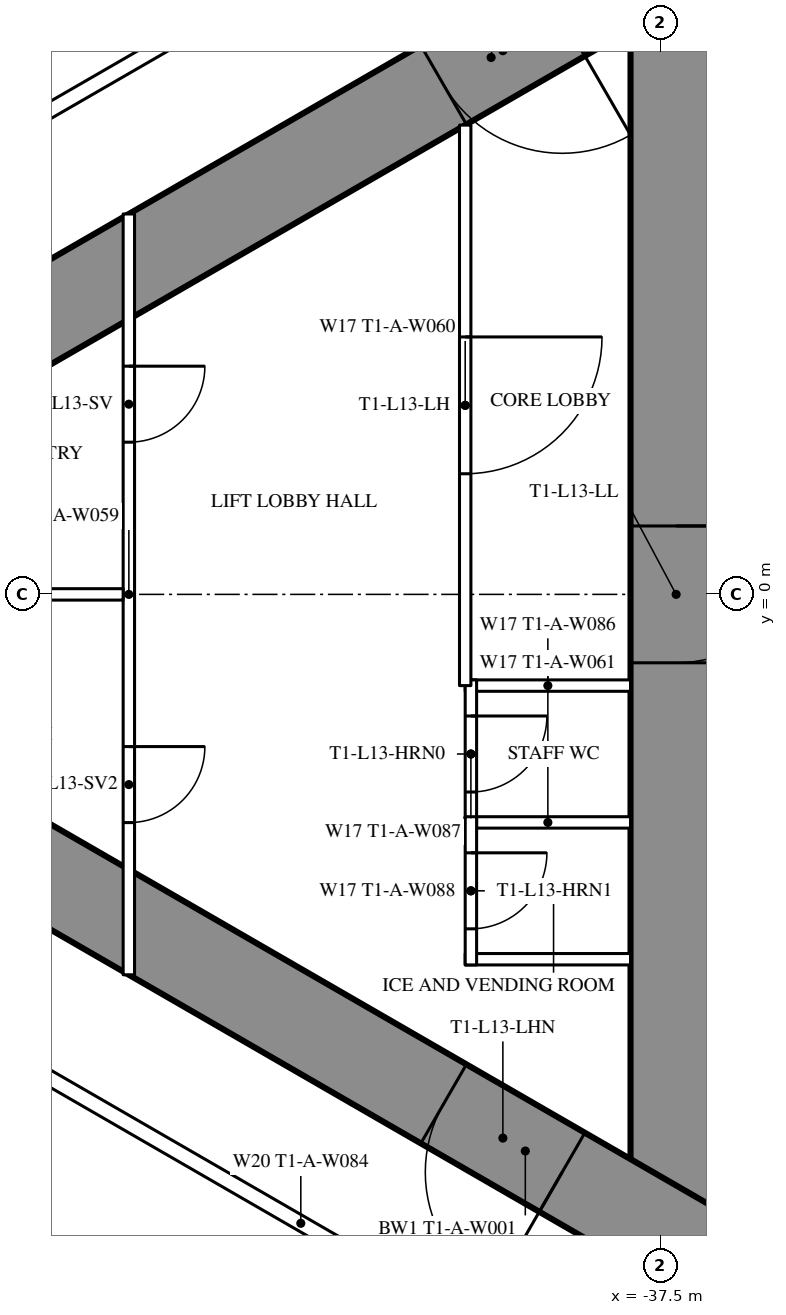
"""IFC4 building model, lengths in metres.
Left out: names, types, materials, properties, quantities, classifications, styles, units other than length and angle.
Written with IfcOpenShell. Run it as: python <this file> out.ifc"""

import sys

from ifc_helpers import new_model, si_unit, direction, frame, frame_2d, origin, place, context, subcontext, project, spatial, rectangle, extrude, element, fill, save


model = new_model("IFC4")
c1 = context("Model", 3, precision=1e-05, world=origin(), true_north=direction((0.0, 1.0)))
c2 = subcontext(c1, "Body", "Model", "MODEL_VIEW")
j1 = project(units=[si_unit("LENGTHUNIT", "METRE"), si_unit("PLANEANGLEUNIT", "RADIAN")], contexts=[c1])
p1 = place(None, origin())
s1 = spatial("IfcSite", under=j1, at=p1, CompositionType="ELEMENT")
p2 = place(p1, origin())
s2 = spatial("IfcBuilding", under=s1, at=p2, CompositionType="ELEMENT")
p3 = place(p2, frame((0.0, 0.0, 53.0)))
s3 = spatial("IfcBuildingStorey", under=s2, at=p3, CompositionType="ELEMENT", Elevation=53.0)
p4 = place(p3, frame((-37.3, 8.6, 0.0), z_axis=(0.0, 0.0, 1.0), x_axis=(0.0, -1.0, 0.0)))
e1 = element("IfcWall", 1, at=p4, inside=s3, PredefinedType="SHEAR", context=c2, shape_type="SweptSolid", body=[
    extrude(rectangle(XDim=17.2, YDim=1.2, at=frame_2d((8.6, 0.0))), origin(), (0.0, 0.0, 1.0), 3.5),
])
p5 = place(p4, frame((7.7, 0.0, 0.0)))
e2 = element("IfcOpeningElement", 2, at=p5, cuts=e1, PredefinedType="OPENING", context=c2, shape_type="SweptSolid", body=[
    extrude(rectangle(XDim=1.8, YDim=2.2, at=frame_2d((0.9, 1.1))), frame((0.0, 0.61, 0.0), z_axis=(0.0, -1.0, 0.0), x_axis=(1.0, 0.0, 0.0)), (0.0, 0.0, 1.0), 1.22),
])
p6 = place(p3, frame((-27.2, 14.3, 0.0), z_axis=(0.0, 0.0, 1.0), x_axis=(-0.866026593062, -0.499997940104, 0.0)))
e3 = element("IfcWall", 3, at=p6, inside=s3, PredefinedType="SHEAR", context=c2, shape_type="SweptSolid", body=[
    extrude(rectangle(XDim=28.946, YDim=1.2, at=frame_2d((14.473, 0.0))), origin(), (0.0, 0.0, 1.0), 3.5),
])
p7 = place(p6, frame((4.6, 0.0, 0.0)))
e4 = element("IfcOpeningElement", 4, at=p7, cuts=e3, PredefinedType="OPENING", context=c2, shape_type="SweptSolid", body=[
    extrude(rectangle(XDim=1.0, YDim=2.2, at=frame_2d((0.5, 1.1))), frame((0.0, 0.61, 0.0), z_axis=(0.0, -1.0, 0.0), x_axis=(1.0, 0.0, 0.0)), (0.0, 0.0, 1.0), 1.22),
])
p8 = place(p6, frame((13.395, 0.0, 0.0)))
e5 = element("IfcOpeningElement", 5, at=p8, cuts=e3, PredefinedType="OPENING", context=c2, shape_type="SweptSolid", body=[
    extrude(rectangle(XDim=1.8, YDim=2.2, at=frame_2d((0.9, 1.1))), frame((0.0, 0.61, 0.0), z_axis=(0.0, -1.0, 0.0), x_axis=(1.0, 0.0, 0.0)), (0.0, 0.0, 1.0), 1.22),
])
p9 = place(p3, frame((-27.2, -14.3, 0.0), z_axis=(0.0, 0.0, 1.0), x_axis=(-0.866024021859, 0.500002393557, 0.0)))
e6 = element("IfcWall", 6, at=p9, inside=s3, PredefinedType="SHEAR", context=c2, shape_type="SweptSolid", body=[
    extrude(rectangle(XDim=27.907, YDim=1.2, at=frame_2d((13.954, 0.0))), origin(), (0.0, 0.0, 1.0), 3.5),
])
p10 = place(p9, frame((4.6, 0.0, 0.0)))
e7 = element("IfcOpeningElement", 7, at=p10, cuts=e6, PredefinedType="OPENING", context=c2, shape_type="SweptSolid", body=[
    extrude(rectangle(XDim=1.0, YDim=2.2, at=frame_2d((0.5, 1.1))), frame((0.0, 0.61, 0.0), z_axis=(0.0, -1.0, 0.0), x_axis=(1.0, 0.0, 0.0)), (0.0, 0.0, 1.0), 1.22),
])
p11 = place(p9, frame((13.395, 0.0, 0.0)))
e8 = element("IfcOpeningElement", 8, at=p11, cuts=e6, PredefinedType="OPENING", context=c2, shape_type="SweptSolid", body=[
    extrude(rectangle(XDim=1.8, YDim=2.2, at=frame_2d((0.9, 1.1))), frame((0.0, 0.61, 0.0), z_axis=(0.0, -1.0, 0.0), x_axis=(1.0, 0.0, 0.0)), (0.0, 0.0, 1.0), 1.22),
])
p12 = place(p3, frame((-37.7, 10.894, 0.0), z_axis=(0.0, 0.0, 1.0), x_axis=(-0.866027905338, -0.499995667157, 0.0)))
e9 = element("IfcWall", 9, at=p12, inside=s3, PredefinedType="PARTITIONING", context=c2, shape_type="SweptSolid", body=[
    extrude(rectangle(XDim=21.787, YDim=0.2, at=frame_2d((10.894, 0.0))), origin(), (0.0, 0.0, 1.0), 3.25),
])
p13 = place(p12, frame((20.237, 0.0, 0.0)))
e10 = element("IfcOpeningElement", 10, at=p13, cuts=e9, PredefinedType="OPENING", context=c2, shape_type="SweptSolid", body=[
    extrude(rectangle(XDim=0.95, YDim=2.2, at=frame_2d((0.475, 1.1))), frame((0.0, 0.11, 0.0), z_axis=(0.0, -1.0, 0.0), x_axis=(1.0, 0.0, 0.0)), (0.0, 0.0, 1.0), 0.22),
])
p14 = place(p12, frame((2.95, 0.0, 0.0)))
e11 = element("IfcOpeningElement", 11, at=p14, cuts=e9, PredefinedType="OPENING", context=c2, shape_type="SweptSolid", body=[
    extrude(rectangle(XDim=0.95, YDim=2.2, at=frame_2d((0.475, 1.1))), frame((0.0, 0.11, 0.0), z_axis=(0.0, -1.0, 0.0), x_axis=(1.0, 0.0, 0.0)), (0.0, 0.0, 1.0), 0.22),
])
p15 = place(p3, frame((-36.92, -11.344, 0.0), z_axis=(0.0, 0.0, 1.0), x_axis=(-0.866025017052, 0.500000669839, 0.0)))
e12 = element("IfcWall", 12, at=p15, inside=s3, PredefinedType="PARTITIONING", context=c2, shape_type="SweptSolid", body=[
    extrude(rectangle(XDim=12.28, YDim=0.2, at=frame_2d((6.14, 0.0))), origin(), (0.0, 0.0, 1.0), 3.25),
])
p16 = place(p15, frame((3.35, 0.0, 0.0)))
e13 = element("IfcOpeningElement", 13, at=p16, cuts=e12, PredefinedType="OPENING", context=c2, shape_type="SweptSolid", body=[
    extrude(rectangle(XDim=1.0, YDim=2.2, at=frame_2d((0.5, 1.1))), frame((0.0, 0.11, 0.0), z_axis=(0.0, -1.0, 0.0), x_axis=(1.0, 0.0, 0.0)), (0.0, 0.0, 1.0), 0.22),
])
for number, where, z_axis, x_axis in (
    (14, (-37.9, -1.2, 0.0), (0.0, 0.0, 1.0), (-1.0, 0.0, 0.0)),
    (15, (-37.9, -3.0, 0.0), (0.0, 0.0, 1.0), (-1.0, 0.0, 0.0)),
    (16, (-37.9, -4.8, 0.0), (0.0, 0.0, 1.0), (-1.0, 0.0, 0.0)),
):
    element("IfcWall", number, at=place(p3, frame(where, z_axis=z_axis, x_axis=x_axis)), inside=s3, PredefinedType="PARTITIONING", context=c2, shape_type="SweptSolid", body=[
        extrude(rectangle(XDim=2.175, YDim=0.15, at=frame_2d((1.087, 0.0))), origin(), (0.0, 0.0, 1.0), 3.25),
    ])
p17 = place(p3, frame((-40.0, -1.125, 0.0), z_axis=(0.0, 0.0, 1.0), x_axis=(0.0, -1.0, 0.0)))
e17 = element("IfcWall", 17, at=p17, inside=s3, PredefinedType="PARTITIONING", context=c2, shape_type="SweptSolid", body=[
    extrude(rectangle(XDim=1.95, YDim=0.15, at=frame_2d((0.975, 0.0))), origin(), (0.0, 0.0, 1.0), 3.25),
])
p18 = place(p17, frame((0.475, 0.0, 0.0)))
e18 = element("IfcOpeningElement", 18, at=p18, cuts=e17, PredefinedType="OPENING", context=c2, shape_type="SweptSolid", body=[
    extrude(rectangle(XDim=1.0, YDim=2.2, at=frame_2d((0.5, 1.1))), frame((0.0, 0.085, 0.0), z_axis=(0.0, -1.0, 0.0), x_axis=(1.0, 0.0, 0.0)), (0.0, 0.0, 1.0), 0.17),
])
p19 = place(p3, frame((-40.0, -2.925, 0.0), z_axis=(0.0, 0.0, 1.0), x_axis=(0.0, -1.0, 0.0)))
e19 = element("IfcWall", 19, at=p19, inside=s3, PredefinedType="PARTITIONING", context=c2, shape_type="SweptSolid", body=[
    extrude(rectangle(XDim=1.95, YDim=0.15, at=frame_2d((0.975, 0.0))), origin(), (0.0, 0.0, 1.0), 3.25),
])
p20 = place(p19, frame((0.475, 0.0, 0.0)))
e20 = element("IfcOpeningElement", 20, at=p20, cuts=e19, PredefinedType="OPENING", context=c2, shape_type="SweptSolid", body=[
    extrude(rectangle(XDim=1.0, YDim=2.2, at=frame_2d((0.5, 1.1))), frame((0.0, 0.085, 0.0), z_axis=(0.0, -1.0, 0.0), x_axis=(1.0, 0.0, 0.0)), (0.0, 0.0, 1.0), 0.17),
])
p21 = place(p3, frame((-40.075, 6.174, 0.0), z_axis=(0.0, 0.0, 1.0), x_axis=(0.0, -1.0, 0.0)))
e21 = element("IfcWall", 21, at=p21, inside=s3, PredefinedType="PARTITIONING", context=c2, shape_type="SweptSolid", body=[
    extrude(rectangle(XDim=7.374, YDim=0.15, at=frame_2d((3.687, 0.0))), origin(), (0.0, 0.0, 1.0), 3.25),
])
p22 = place(p21, frame((2.787, 0.0, 0.0)))
e22 = element("IfcOpeningElement", 22, at=p22, cuts=e21, PredefinedType="OPENING", context=c2, shape_type="SweptSolid", body=[
    extrude(rectangle(XDim=1.8, YDim=2.2, at=frame_2d((0.9, 1.1))), frame((0.0, 0.085, 0.0), z_axis=(0.0, -1.0, 0.0), x_axis=(1.0, 0.0, 0.0)), (0.0, 0.0, 1.0), 0.17),
])
p23 = place(p3, frame((-44.5, 5.005, 0.0), z_axis=(0.0, 0.0, 1.0), x_axis=(0.0, -1.0, 0.0)))
e23 = element("IfcWall", 23, at=p23, inside=s3, PredefinedType="PARTITIONING", context=c2, shape_type="SweptSolid", body=[
    extrude(rectangle(XDim=10.009, YDim=0.15, at=frame_2d((5.005, 0.0))), origin(), (0.0, 0.0, 1.0), 2.45),
])
p24 = place(p23, frame((2.002, 0.0, 0.0)))
e24 = element("IfcOpeningElement", 24, at=p24, cuts=e23, PredefinedType="OPENING", context=c2, shape_type="SweptSolid", body=[
    extrude(rectangle(XDim=1.0, YDim=2.2, at=frame_2d((0.5, 1.1))), frame((0.0, 0.085, 0.0), z_axis=(0.0, -1.0, 0.0), x_axis=(1.0, 0.0, 0.0)), (0.0, 0.0, 1.0), 0.17),
])
p25 = place(p23, frame((7.007, 0.0, 0.0)))
e25 = element("IfcOpeningElement", 25, at=p25, cuts=e23, PredefinedType="OPENING", context=c2, shape_type="SweptSolid", body=[
    extrude(rectangle(XDim=1.0, YDim=2.2, at=frame_2d((0.5, 1.1))), frame((0.0, 0.085, 0.0), z_axis=(0.0, -1.0, 0.0), x_axis=(1.0, 0.0, 0.0)), (0.0, 0.0, 1.0), 0.17),
])
p26 = place(p3, frame((-44.575, 0.0, 0.0), z_axis=(0.0, 0.0, 1.0), x_axis=(-1.0, 0.0, 0.0)))
e26 = element("IfcWall", 26, at=p26, inside=s3, PredefinedType="PARTITIONING", context=c2, shape_type="SweptSolid", body=[
    extrude(rectangle(XDim=8.593, YDim=0.15, at=frame_2d((4.297, 0.0))), origin(), (0.0, 0.0, 1.0), 2.25),
])
p27 = place(p18, origin())
e27 = element("IfcDoor", 27, at=p27, inside=s3, OperationType="SINGLE_SWING_LEFT", PredefinedType="DOOR", context=c2, shape_type="SweptSolid", body=[
    extrude(rectangle(XDim=1.0, YDim=2.2, at=frame_2d((0.5, 1.1))), frame((0.0, 0.025, 0.0), z_axis=(0.0, -1.0, 0.0), x_axis=(1.0, 0.0, 0.0)), (0.0, 0.0, 1.0), 0.05),
])
fill(e18, e27)
p28 = place(p20, origin())
e28 = element("IfcDoor", 28, at=p28, inside=s3, OperationType="SINGLE_SWING_LEFT", PredefinedType="DOOR", context=c2, shape_type="SweptSolid", body=[
    extrude(rectangle(XDim=1.0, YDim=2.2, at=frame_2d((0.5, 1.1))), frame((0.0, 0.025, 0.0), z_axis=(0.0, -1.0, 0.0), x_axis=(1.0, 0.0, 0.0)), (0.0, 0.0, 1.0), 0.05),
])
fill(e20, e28)
p29 = place(p22, origin())
e29 = element("IfcDoor", 29, at=p29, inside=s3, OperationType="DOUBLE_DOOR_SINGLE_SWING", PredefinedType="DOOR", context=c2, shape_type="SweptSolid", body=[
    extrude(rectangle(XDim=1.8, YDim=2.2, at=frame_2d((0.9, 1.1))), frame((0.0, 0.025, 0.0), z_axis=(0.0, -1.0, 0.0), x_axis=(1.0, 0.0, 0.0)), (0.0, 0.0, 1.0), 0.05),
])
fill(e22, e29)
p30 = place(p24, origin())
e30 = element("IfcDoor", 30, at=p30, inside=s3, OperationType="SINGLE_SWING_LEFT", PredefinedType="DOOR", context=c2, shape_type="SweptSolid", body=[
    extrude(rectangle(XDim=1.0, YDim=2.2, at=frame_2d((0.5, 1.1))), frame((0.0, 0.025, 0.0), z_axis=(0.0, -1.0, 0.0), x_axis=(1.0, 0.0, 0.0)), (0.0, 0.0, 1.0), 0.05),
])
fill(e24, e30)
p31 = place(p25, origin())
e31 = element("IfcDoor", 31, at=p31, inside=s3, OperationType="SINGLE_SWING_LEFT", PredefinedType="DOOR", context=c2, shape_type="SweptSolid", body=[
    extrude(rectangle(XDim=1.0, YDim=2.2, at=frame_2d((0.5, 1.1))), frame((0.0, 0.025, 0.0), z_axis=(0.0, -1.0, 0.0), x_axis=(1.0, 0.0, 0.0)), (0.0, 0.0, 1.0), 0.05),
])
fill(e25, e31)
p32 = place(p8, origin())
e32 = element("IfcDoor", 32, at=p32, inside=s3, OperationType="DOUBLE_DOOR_SINGLE_SWING", PredefinedType="DOOR", context=c2, shape_type="SweptSolid", body=[
    extrude(rectangle(XDim=1.8, YDim=2.2, at=frame_2d((0.9, 1.1))), frame((0.0, 0.025, 0.0), z_axis=(0.0, -1.0, 0.0), x_axis=(1.0, 0.0, 0.0)), (0.0, 0.0, 1.0), 0.05),
])
fill(e5, e32)
p33 = place(p11, origin())
e33 = element("IfcDoor", 33, at=p33, inside=s3, OperationType="DOUBLE_DOOR_SINGLE_SWING", PredefinedType="DOOR", context=c2, shape_type="SweptSolid", body=[
    extrude(rectangle(XDim=1.8, YDim=2.2, at=frame_2d((0.9, 1.1))), frame((0.0, 0.025, 0.0), z_axis=(0.0, -1.0, 0.0), x_axis=(1.0, 0.0, 0.0)), (0.0, 0.0, 1.0), 0.05),
])
fill(e8, e33)
p34 = place(p5, origin())
e34 = element("IfcDoor", 34, at=p34, inside=s3, OperationType="DOUBLE_DOOR_SINGLE_SWING", PredefinedType="DOOR", context=c2, shape_type="SweptSolid", body=[
    extrude(rectangle(XDim=1.8, YDim=2.2, at=frame_2d((0.9, 1.1))), frame((0.0, 0.025, 0.0), z_axis=(0.0, -1.0, 0.0), x_axis=(1.0, 0.0, 0.0)), (0.0, 0.0, 1.0), 0.05),
])
fill(e2, e34)
save(model, sys.argv[1])
